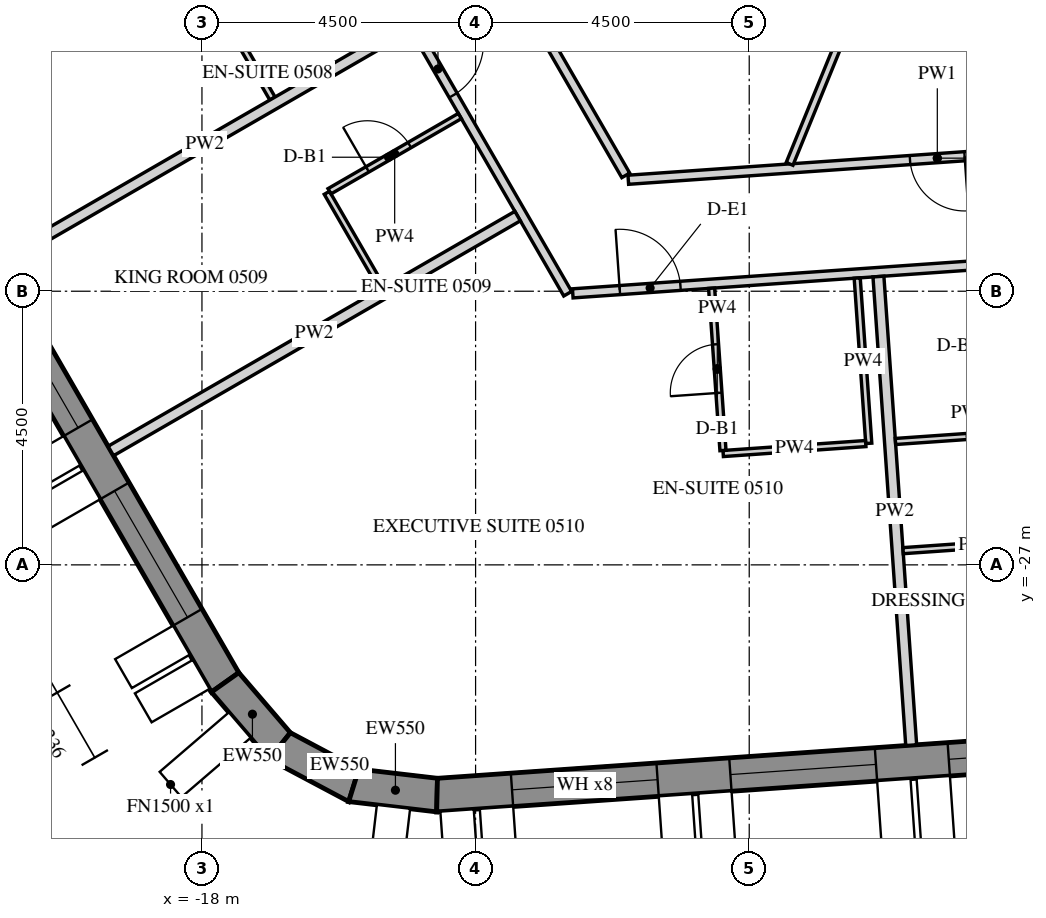
"""IFC4 building model, lengths in metres.
Left out: names, types, materials, properties, quantities, classifications, styles, units other than length and angle.
Written with IfcOpenShell. Run it as: python <this file> out.ifc"""

import sys

from ifc_helpers import new_model, si_unit, direction, frame, frame_2d, origin, place, context, subcontext, project, spatial, polyline, rectangle, outline, extrude, element, fill, save


model = new_model("IFC4")
c1 = context("Model", 3, precision=1e-05, world=origin(), true_north=direction((0.0, 1.0)))
c2 = subcontext(c1, "Body", "Model", "MODEL_VIEW")
j1 = project(units=[si_unit("LENGTHUNIT", "METRE"), si_unit("PLANEANGLEUNIT", "RADIAN")], contexts=[c1])
p1 = place(None, origin())
s1 = spatial("IfcSite", under=j1, at=p1, CompositionType="ELEMENT")
p2 = place(p1, origin())
s2 = spatial("IfcBuilding", under=s1, at=p2, CompositionType="ELEMENT")
p3 = place(p2, frame((0.0, 0.0, 80.4)))
s3 = spatial("IfcBuildingStorey", under=s2, at=p3, CompositionType="ELEMENT", Elevation=80.4)
p4 = place(p3, frame((-32.655, -2.89, -0.15), z_axis=(0.0, 0.0, 1.0), x_axis=(0.499997711317, -0.866026725152, 0.0)))
e1 = element("IfcWall", 1, at=p4, inside=s3, PredefinedType="SOLIDWALL", context=c2, shape_type="SweptSolid", body=[
    extrude(outline(polyline([(-0.022, -0.275), (30.097, -0.275), (30.045, 0.275), (0.022, 0.275), (-0.022, -0.275)])), origin(), (0.0, 0.0, 1.0), 3.9),
])
p5 = place(p4, frame((1.236, 0.0, 1.05)))
e2 = element("IfcOpeningElement", 2, at=p5, cuts=e1, PredefinedType="OPENING", context=c2, shape_type="SweptSolid", body=[
    extrude(rectangle(XDim=2.4, YDim=2.4, at=frame_2d((1.2, 1.2))), frame((0.0, 0.285, 0.0), z_axis=(0.0, -1.0, 0.0), x_axis=(1.0, 0.0, 0.0)), (0.0, 0.0, 1.0), 0.57),
])
p6 = place(p4, frame((4.835, 0.0, 1.05)))
e3 = element("IfcOpeningElement", 3, at=p6, cuts=e1, PredefinedType="OPENING", context=c2, shape_type="SweptSolid", body=[
    extrude(rectangle(XDim=2.4, YDim=2.4, at=frame_2d((1.2, 1.2))), frame((0.0, 0.285, 0.0), z_axis=(0.0, -1.0, 0.0), x_axis=(1.0, 0.0, 0.0)), (0.0, 0.0, 1.0), 0.57),
])
p7 = place(p4, frame((8.436, 0.0, 1.05)))
e4 = element("IfcOpeningElement", 4, at=p7, cuts=e1, PredefinedType="OPENING", context=c2, shape_type="SweptSolid", body=[
    extrude(rectangle(XDim=2.4, YDim=2.4, at=frame_2d((1.2, 1.2))), frame((0.0, 0.285, 0.0), z_axis=(0.0, -1.0, 0.0), x_axis=(1.0, 0.0, 0.0)), (0.0, 0.0, 1.0), 0.57),
])
p8 = place(p4, frame((12.035, 0.0, 1.05)))
e5 = element("IfcOpeningElement", 5, at=p8, cuts=e1, PredefinedType="OPENING", context=c2, shape_type="SweptSolid", body=[
    extrude(rectangle(XDim=2.4, YDim=2.4, at=frame_2d((1.2, 1.2))), frame((0.0, 0.285, 0.0), z_axis=(0.0, -1.0, 0.0), x_axis=(1.0, 0.0, 0.0)), (0.0, 0.0, 1.0), 0.57),
])
p9 = place(p4, frame((15.635, 0.0, 1.05)))
e6 = element("IfcOpeningElement", 6, at=p9, cuts=e1, PredefinedType="OPENING", context=c2, shape_type="SweptSolid", body=[
    extrude(rectangle(XDim=2.4, YDim=2.4, at=frame_2d((1.2, 1.2))), frame((0.0, 0.285, 0.0), z_axis=(0.0, -1.0, 0.0), x_axis=(1.0, 0.0, 0.0)), (0.0, 0.0, 1.0), 0.57),
])
p10 = place(p4, frame((19.236, 0.0, 1.05)))
e7 = element("IfcOpeningElement", 7, at=p10, cuts=e1, PredefinedType="OPENING", context=c2, shape_type="SweptSolid", body=[
    extrude(rectangle(XDim=2.4, YDim=2.4, at=frame_2d((1.2, 1.2))), frame((0.0, 0.285, 0.0), z_axis=(0.0, -1.0, 0.0), x_axis=(1.0, 0.0, 0.0)), (0.0, 0.0, 1.0), 0.57),
])
p11 = place(p4, frame((22.835, 0.0, 1.05)))
e8 = element("IfcOpeningElement", 8, at=p11, cuts=e1, PredefinedType="OPENING", context=c2, shape_type="SweptSolid", body=[
    extrude(rectangle(XDim=2.4, YDim=2.4, at=frame_2d((1.2, 1.2))), frame((0.0, 0.285, 0.0), z_axis=(0.0, -1.0, 0.0), x_axis=(1.0, 0.0, 0.0)), (0.0, 0.0, 1.0), 0.57),
])
p12 = place(p4, frame((26.436, 0.0, 1.05)))
e9 = element("IfcOpeningElement", 9, at=p12, cuts=e1, PredefinedType="OPENING", context=c2, shape_type="SweptSolid", body=[
    extrude(rectangle(XDim=2.4, YDim=2.4, at=frame_2d((1.2, 1.2))), frame((0.0, 0.285, 0.0), z_axis=(0.0, -1.0, 0.0), x_axis=(1.0, 0.0, 0.0)), (0.0, 0.0, 1.0), 0.57),
])
p13 = place(p3, frame((-17.619, -28.932, -0.15), z_axis=(0.0, 0.0, 1.0), x_axis=(0.651621950847, -0.758543890078, 0.0)))
e10 = element("IfcWall", 10, at=p13, inside=s3, PredefinedType="SOLIDWALL", context=c2, shape_type="SweptSolid", body=[
    extrude(outline(polyline([(-0.026, -0.275), (1.431, -0.275), (1.327, 0.275), (0.026, 0.275), (-0.026, -0.275)])), origin(), (0.0, 0.0, 1.0), 3.9),
])
p14 = place(p3, frame((-16.721, -29.979, -0.15), z_axis=(0.0, 0.0, 1.0), x_axis=(0.882994189209, -0.469383917304, 0.0)))
e11 = element("IfcWall", 11, at=p14, inside=s3, PredefinedType="SOLIDWALL", context=c2, shape_type="SweptSolid", body=[
    extrude(outline(polyline([(-0.052, -0.275), (1.431, -0.275), (1.327, 0.275), (0.052, 0.275), (-0.052, -0.275)])), origin(), (0.0, 0.0, 1.0), 3.9),
])
p15 = place(p3, frame((-15.503, -30.626, -0.15), z_axis=(0.0, 0.0, 1.0), x_axis=(0.993232537394, -0.11614269956, 0.0)))
e12 = element("IfcWall", 12, at=p15, inside=s3, PredefinedType="SOLIDWALL", context=c2, shape_type="SweptSolid", body=[
    extrude(outline(polyline([(-0.052, -0.275), (1.405, -0.275), (1.353, 0.275), (0.052, 0.275), (-0.052, -0.275)])), origin(), (0.0, 0.0, 1.0), 3.9),
])
p16 = place(p3, frame((-14.134, -30.786, -0.15), z_axis=(0.0, 0.0, 1.0), x_axis=(0.997564037441, 0.069756657061, 0.0)))
e13 = element("IfcWall", 13, at=p16, inside=s3, PredefinedType="SOLIDWALL", context=c2, shape_type="SweptSolid", body=[
    extrude(outline(polyline([(-0.026, -0.275), (30.094, -0.275), (30.049, 0.275), (0.026, 0.275), (-0.026, -0.275)])), origin(), (0.0, 0.0, 1.0), 3.9),
])
p17 = place(p16, frame((1.236, 0.0, 1.05)))
e14 = element("IfcOpeningElement", 14, at=p17, cuts=e13, PredefinedType="OPENING", context=c2, shape_type="SweptSolid", body=[
    extrude(rectangle(XDim=2.4, YDim=2.4, at=frame_2d((1.2, 1.2))), frame((0.0, 0.285, 0.0), z_axis=(0.0, -1.0, 0.0), x_axis=(1.0, 0.0, 0.0)), (0.0, 0.0, 1.0), 0.57),
])
p18 = place(p16, frame((4.835, 0.0, 1.05)))
e15 = element("IfcOpeningElement", 15, at=p18, cuts=e13, PredefinedType="OPENING", context=c2, shape_type="SweptSolid", body=[
    extrude(rectangle(XDim=2.4, YDim=2.4, at=frame_2d((1.2, 1.2))), frame((0.0, 0.285, 0.0), z_axis=(0.0, -1.0, 0.0), x_axis=(1.0, 0.0, 0.0)), (0.0, 0.0, 1.0), 0.57),
])
p19 = place(p16, frame((8.436, 0.0, 1.05)))
e16 = element("IfcOpeningElement", 16, at=p19, cuts=e13, PredefinedType="OPENING", context=c2, shape_type="SweptSolid", body=[
    extrude(rectangle(XDim=2.4, YDim=2.4, at=frame_2d((1.2, 1.2))), frame((0.0, 0.285, 0.0), z_axis=(0.0, -1.0, 0.0), x_axis=(1.0, 0.0, 0.0)), (0.0, 0.0, 1.0), 0.57),
])
p20 = place(p16, frame((12.035, 0.0, 1.05)))
e17 = element("IfcOpeningElement", 17, at=p20, cuts=e13, PredefinedType="OPENING", context=c2, shape_type="SweptSolid", body=[
    extrude(rectangle(XDim=2.4, YDim=2.4, at=frame_2d((1.2, 1.2))), frame((0.0, 0.285, 0.0), z_axis=(0.0, -1.0, 0.0), x_axis=(1.0, 0.0, 0.0)), (0.0, 0.0, 1.0), 0.57),
])
p21 = place(p16, frame((15.635, 0.0, 1.05)))
e18 = element("IfcOpeningElement", 18, at=p21, cuts=e13, PredefinedType="OPENING", context=c2, shape_type="SweptSolid", body=[
    extrude(rectangle(XDim=2.4, YDim=2.4, at=frame_2d((1.2, 1.2))), frame((0.0, 0.285, 0.0), z_axis=(0.0, -1.0, 0.0), x_axis=(1.0, 0.0, 0.0)), (0.0, 0.0, 1.0), 0.57),
])
p22 = place(p16, frame((19.236, 0.0, 1.05)))
e19 = element("IfcOpeningElement", 19, at=p22, cuts=e13, PredefinedType="OPENING", context=c2, shape_type="SweptSolid", body=[
    extrude(rectangle(XDim=2.4, YDim=2.4, at=frame_2d((1.2, 1.2))), frame((0.0, 0.285, 0.0), z_axis=(0.0, -1.0, 0.0), x_axis=(1.0, 0.0, 0.0)), (0.0, 0.0, 1.0), 0.57),
])
p23 = place(p16, frame((22.835, 0.0, 1.05)))
e20 = element("IfcOpeningElement", 20, at=p23, cuts=e13, PredefinedType="OPENING", context=c2, shape_type="SweptSolid", body=[
    extrude(rectangle(XDim=2.4, YDim=2.4, at=frame_2d((1.2, 1.2))), frame((0.0, 0.285, 0.0), z_axis=(0.0, -1.0, 0.0), x_axis=(1.0, 0.0, 0.0)), (0.0, 0.0, 1.0), 0.57),
])
p24 = place(p16, frame((26.436, 0.0, 1.05)))
e21 = element("IfcOpeningElement", 21, at=p24, cuts=e13, PredefinedType="OPENING", context=c2, shape_type="SweptSolid", body=[
    extrude(rectangle(XDim=2.4, YDim=2.4, at=frame_2d((1.2, 1.2))), frame((0.0, 0.285, 0.0), z_axis=(0.0, -1.0, 0.0), x_axis=(1.0, 0.0, 0.0)), (0.0, 0.0, 1.0), 0.57),
])
p25 = place(p3, frame((-23.743, -2.175, 0.0), z_axis=(0.0, 0.0, 1.0), x_axis=(0.499992353047, -0.86602981871, 0.0)))
e22 = element("IfcWall", 22, at=p25, inside=s3, PredefinedType="PARTITIONING", context=c2, shape_type="SweptSolid", body=[
    extrude(rectangle(XDim=23.516, YDim=0.15, at=frame_2d((11.758, 0.0))), origin(), (0.0, 0.0, 1.0), 2.988),
])
p26 = place(p25, frame((6.256, 0.0, 0.0)))
e23 = element("IfcOpeningElement", 23, at=p26, cuts=e22, PredefinedType="OPENING", context=c2, shape_type="SweptSolid", body=[
    extrude(rectangle(XDim=1.0, YDim=2.1, at=frame_2d((0.5, 1.05))), frame((0.0, 0.085, 0.0), z_axis=(0.0, -1.0, 0.0), x_axis=(1.0, 0.0, 0.0)), (0.0, 0.0, 1.0), 0.17),
])
p27 = place(p25, frame((13.099, 0.0, 0.0)))
e24 = element("IfcOpeningElement", 24, at=p27, cuts=e22, PredefinedType="OPENING", context=c2, shape_type="SweptSolid", body=[
    extrude(rectangle(XDim=1.0, YDim=2.1, at=frame_2d((0.5, 1.05))), frame((0.0, 0.085, 0.0), z_axis=(0.0, -1.0, 0.0), x_axis=(1.0, 0.0, 0.0)), (0.0, 0.0, 1.0), 0.17),
])
p28 = place(p25, frame((18.749, 0.0, 0.0)))
e25 = element("IfcOpeningElement", 25, at=p28, cuts=e22, PredefinedType="OPENING", context=c2, shape_type="SweptSolid", body=[
    extrude(rectangle(XDim=1.0, YDim=2.1, at=frame_2d((0.5, 1.05))), frame((0.0, 0.085, 0.0), z_axis=(0.0, -1.0, 0.0), x_axis=(1.0, 0.0, 0.0)), (0.0, 0.0, 1.0), 0.17),
])
p29 = place(p3, frame((-11.902, -22.535, 0.0), z_axis=(0.0, 0.0, 1.0), x_axis=(0.997564081796, 0.069756022752, 0.0)))
e26 = element("IfcWall", 26, at=p29, inside=s3, PredefinedType="PARTITIONING", context=c2, shape_type="SweptSolid", body=[
    extrude(rectangle(XDim=21.668, YDim=0.15, at=frame_2d((10.834, 0.0))), origin(), (0.0, 0.0, 1.0), 2.988),
])
p30 = place(p29, frame((0.775, 0.0, 0.0)))
e27 = element("IfcOpeningElement", 27, at=p30, cuts=e26, PredefinedType="OPENING", context=c2, shape_type="SweptSolid", body=[
    extrude(rectangle(XDim=1.0, YDim=2.1, at=frame_2d((0.5, 1.05))), frame((0.0, 0.085, 0.0), z_axis=(0.0, -1.0, 0.0), x_axis=(1.0, 0.0, 0.0)), (0.0, 0.0, 1.0), 0.17),
])
p31 = place(p29, frame((11.234, 0.0, 0.0)))
e28 = element("IfcOpeningElement", 28, at=p31, cuts=e26, PredefinedType="OPENING", context=c2, shape_type="SweptSolid", body=[
    extrude(rectangle(XDim=1.0, YDim=2.1, at=frame_2d((0.5, 1.05))), frame((0.0, 0.085, 0.0), z_axis=(0.0, -1.0, 0.0), x_axis=(1.0, 0.0, 0.0)), (0.0, 0.0, 1.0), 0.17),
])
p32 = place(p29, frame((19.451, 0.0, 0.0)))
e29 = element("IfcOpeningElement", 29, at=p32, cuts=e26, PredefinedType="OPENING", context=c2, shape_type="SweptSolid", body=[
    extrude(rectangle(XDim=1.0, YDim=2.1, at=frame_2d((0.5, 1.05))), frame((0.0, 0.085, 0.0), z_axis=(0.0, -1.0, 0.0), x_axis=(1.0, 0.0, 0.0)), (0.0, 0.0, 1.0), 0.17),
])
p33 = place(p3, frame((-0.825, -19.956, 0.0), z_axis=(0.0, 0.0, 1.0), x_axis=(-0.997562587881, -0.069777383582, 0.0)))
e30 = element("IfcWall", 30, at=p33, inside=s3, PredefinedType="PARTITIONING", context=c2, shape_type="SweptSolid", body=[
    extrude(rectangle(XDim=10.189, YDim=0.15, at=frame_2d((5.094, 0.0))), origin(), (0.0, 0.0, 1.0), 2.988),
])
p34 = place(p33, frame((4.644, 0.0, 0.0)))
e31 = element("IfcOpeningElement", 31, at=p34, cuts=e30, PredefinedType="OPENING", context=c2, shape_type="SweptSolid", body=[
    extrude(rectangle(XDim=0.9, YDim=2.1, at=frame_2d((0.45, 1.05))), frame((0.0, 0.085, 0.0), z_axis=(0.0, -1.0, 0.0), x_axis=(1.0, 0.0, 0.0)), (0.0, 0.0, 1.0), 0.17),
])
p35 = place(p3, frame((-11.031, -20.595, 0.0), z_axis=(0.0, 0.0, 1.0), x_axis=(-0.499987422378, 0.866032665356, 0.0)))
e32 = element("IfcWall", 32, at=p35, inside=s3, PredefinedType="PARTITIONING", context=c2, shape_type="SweptSolid", body=[
    extrude(rectangle(XDim=11.299, YDim=0.15, at=frame_2d((5.649, 0.0))), origin(), (0.0, 0.0, 1.0), 2.988),
])
p36 = place(p35, frame((5.199, 0.0, 0.0)))
e33 = element("IfcOpeningElement", 33, at=p36, cuts=e32, PredefinedType="OPENING", context=c2, shape_type="SweptSolid", body=[
    extrude(rectangle(XDim=0.9, YDim=2.1, at=frame_2d((0.45, 1.05))), frame((0.0, 0.085, 0.0), z_axis=(0.0, -1.0, 0.0), x_axis=(1.0, 0.0, 0.0)), (0.0, 0.0, 1.0), 0.17),
])
p37 = place(p3, frame((-16.841, -19.331, 0.0), z_axis=(0.0, 0.0, 1.0), x_axis=(-0.500015210774, 0.866016621662, 0.0)))
e34 = element("IfcWall", 34, at=p37, inside=s3, PredefinedType="PARTITIONING", context=c2, shape_type="SweptSolid", body=[
    extrude(rectangle(XDim=2.31, YDim=0.1, at=frame_2d((1.155, 0.0))), origin(), (0.0, 0.0, 1.0), 2.988),
])
p38 = place(p3, frame((-21.299, -22.009, 0.0), z_axis=(0.0, 0.0, 1.0), x_axis=(0.866019273868, 0.500010617176, 0.0)))
e35 = element("IfcWall", 35, at=p38, inside=s3, PredefinedType="PARTITIONING", context=c2, shape_type="SweptSolid", body=[
    extrude(rectangle(XDim=7.725, YDim=0.18, at=frame_2d((3.862, 0.0))), origin(), (0.0, 0.0, 1.0), 2.988),
])
p39 = place(p3, frame((-15.041, -22.449, 0.0), z_axis=(0.0, 0.0, 1.0), x_axis=(-0.499983199978, 0.866035103064, 0.0)))
e36 = element("IfcWall", 36, at=p39, inside=s3, PredefinedType="PARTITIONING", context=c2, shape_type="SweptSolid", body=[
    extrude(rectangle(XDim=1.81, YDim=0.1, at=frame_2d((0.905, 0.0))), origin(), (0.0, 0.0, 1.0), 2.988),
])
p40 = place(p3, frame((-15.902, -20.856, 0.0), z_axis=(0.0, 0.0, 1.0), x_axis=(0.866031185235, 0.4999899861, 0.0)))
e37 = element("IfcWall", 37, at=p40, inside=s3, PredefinedType="PARTITIONING", context=c2, shape_type="SweptSolid", body=[
    extrude(rectangle(XDim=2.475, YDim=0.1, at=frame_2d((1.238, 0.0))), origin(), (0.0, 0.0, 1.0), 2.988),
])
p41 = place(p40, frame((0.72, 0.0, 0.0)))
e38 = element("IfcOpeningElement", 38, at=p41, cuts=e37, PredefinedType="OPENING", context=c2, shape_type="SweptSolid", body=[
    extrude(rectangle(XDim=0.8, YDim=2.1, at=frame_2d((0.4, 1.05))), frame((0.0, 0.06, 0.0), z_axis=(0.0, -1.0, 0.0), x_axis=(1.0, 0.0, 0.0)), (0.0, 0.0, 1.0), 0.12),
])
p42 = place(p3, frame((-19.499, -25.127, 0.0), z_axis=(0.0, 0.0, 1.0), x_axis=(0.866027174938, 0.499996932259, 0.0)))
e39 = element("IfcWall", 39, at=p42, inside=s3, PredefinedType="PARTITIONING", context=c2, shape_type="SweptSolid", body=[
    extrude(rectangle(XDim=7.725, YDim=0.18, at=frame_2d((3.863, 0.0))), origin(), (0.0, 0.0, 1.0), 2.988),
])
p43 = place(p3, frame((-7.224, -22.283, 0.0), z_axis=(0.0, 0.0, 1.0), x_axis=(0.069795247212, -0.997561338198, 0.0)))
e40 = element("IfcWall", 40, at=p43, inside=s3, PredefinedType="PARTITIONING", context=c2, shape_type="SweptSolid", body=[
    extrude(rectangle(XDim=2.725, YDim=0.1, at=frame_2d((1.362, 0.0))), origin(), (0.0, 0.0, 1.0), 2.988),
])
p44 = place(p3, frame((-7.084, -25.005, 0.0), z_axis=(0.0, 0.0, 1.0), x_axis=(-0.997567715103, -0.06970404424, 0.0)))
e41 = element("IfcWall", 41, at=p44, inside=s3, PredefinedType="PARTITIONING", context=c2, shape_type="SweptSolid", body=[
    extrude(rectangle(XDim=2.35, YDim=0.1, at=frame_2d((1.175, 0.0))), origin(), (0.0, 0.0, 1.0), 2.988),
])
p45 = place(p3, frame((-9.432, -25.119, 0.0), z_axis=(0.0, 0.0, 1.0), x_axis=(-0.069729221413, 0.997565955554, 0.0)))
e42 = element("IfcWall", 42, at=p45, inside=s3, PredefinedType="PARTITIONING", context=c2, shape_type="SweptSolid", body=[
    extrude(rectangle(XDim=2.675, YDim=0.1, at=frame_2d((1.337, 0.0))), origin(), (0.0, 0.0, 1.0), 2.988),
])
p46 = place(p45, frame((0.95, 0.0, 0.0)))
e43 = element("IfcOpeningElement", 43, at=p46, cuts=e42, PredefinedType="OPENING", context=c2, shape_type="SweptSolid", body=[
    extrude(rectangle(XDim=0.8, YDim=2.1, at=frame_2d((0.4, 1.05))), frame((0.0, 0.06, 0.0), z_axis=(0.0, -1.0, 0.0), x_axis=(1.0, 0.0, 0.0)), (0.0, 0.0, 1.0), 0.12),
])
p47 = place(p3, frame((-6.336, -29.965, 0.0), z_axis=(0.0, 0.0, 1.0), x_axis=(-0.069780381152, 0.997562378203, 0.0)))
e44 = element("IfcWall", 44, at=p47, inside=s3, PredefinedType="PARTITIONING", context=c2, shape_type="SweptSolid", body=[
    extrude(rectangle(XDim=7.725, YDim=0.18, at=frame_2d((3.863, 0.0))), origin(), (0.0, 0.0, 1.0), 2.988),
])
p48 = place(p3, frame((-4.016, -26.595, 0.0), z_axis=(0.0, 0.0, 1.0), x_axis=(-0.997563389425, -0.069765923475, 0.0)))
e45 = element("IfcWall", 45, at=p48, inside=s3, PredefinedType="PARTITIONING", context=c2, shape_type="SweptSolid", body=[
    extrude(rectangle(XDim=2.46, YDim=0.1, at=frame_2d((1.23, 0.0))), origin(), (0.0, 0.0, 1.0), 2.988),
])
p49 = place(p3, frame((-6.595, -24.971, 0.0), z_axis=(0.0, 0.0, 1.0), x_axis=(0.997562906323, 0.069772830877, 0.0)))
e46 = element("IfcWall", 46, at=p49, inside=s3, PredefinedType="PARTITIONING", context=c2, shape_type="SweptSolid", body=[
    extrude(rectangle(XDim=2.46, YDim=0.1, at=frame_2d((1.23, 0.0))), origin(), (0.0, 0.0, 1.0), 2.988),
])
p50 = place(p3, frame((-5.719, -14.0, 0.0), z_axis=(0.0, 0.0, 1.0), x_axis=(-0.378193217714, -0.925726682166, 0.0)))
e47 = element("IfcWall", 47, at=p50, inside=s3, PredefinedType="PARTITIONING", context=c2, shape_type="SweptSolid", body=[
    extrude(rectangle(XDim=6.92, YDim=0.12, at=frame_2d((3.46, 0.0))), origin(), (0.0, 0.0, 1.0), 2.988),
])
p51 = place(p11, frame((0.0, 0.205, 0.0)))
e48 = element("IfcWindow", 48, at=p51, inside=s3, PartitioningType="DOUBLE_PANEL_VERTICAL", PredefinedType="WINDOW", context=c2, shape_type="SweptSolid", body=[
    extrude(rectangle(XDim=2.4, YDim=2.4, at=frame_2d((1.2, 1.2))), frame((0.0, 0.03, 0.0), z_axis=(0.0, -1.0, 0.0), x_axis=(1.0, 0.0, 0.0)), (0.0, 0.0, 1.0), 0.06),
])
fill(e8, e48)
p52 = place(p12, frame((0.0, 0.205, 0.0)))
e49 = element("IfcWindow", 49, at=p52, inside=s3, PartitioningType="DOUBLE_PANEL_VERTICAL", PredefinedType="WINDOW", context=c2, shape_type="SweptSolid", body=[
    extrude(rectangle(XDim=2.4, YDim=2.4, at=frame_2d((1.2, 1.2))), frame((0.0, 0.03, 0.0), z_axis=(0.0, -1.0, 0.0), x_axis=(1.0, 0.0, 0.0)), (0.0, 0.0, 1.0), 0.06),
])
fill(e9, e49)
p53 = place(p17, frame((0.0, 0.205, 0.0)))
e50 = element("IfcWindow", 50, at=p53, inside=s3, PartitioningType="DOUBLE_PANEL_VERTICAL", PredefinedType="WINDOW", context=c2, shape_type="SweptSolid", body=[
    extrude(rectangle(XDim=2.4, YDim=2.4, at=frame_2d((1.2, 1.2))), frame((0.0, 0.03, 0.0), z_axis=(0.0, -1.0, 0.0), x_axis=(1.0, 0.0, 0.0)), (0.0, 0.0, 1.0), 0.06),
])
fill(e14, e50)
p54 = place(p18, frame((0.0, 0.205, 0.0)))
e51 = element("IfcWindow", 51, at=p54, inside=s3, PartitioningType="DOUBLE_PANEL_VERTICAL", PredefinedType="WINDOW", context=c2, shape_type="SweptSolid", body=[
    extrude(rectangle(XDim=2.4, YDim=2.4, at=frame_2d((1.2, 1.2))), frame((0.0, 0.03, 0.0), z_axis=(0.0, -1.0, 0.0), x_axis=(1.0, 0.0, 0.0)), (0.0, 0.0, 1.0), 0.06),
])
fill(e15, e51)
p55 = place(p19, frame((0.0, 0.205, 0.0)))
e52 = element("IfcWindow", 52, at=p55, inside=s3, PartitioningType="DOUBLE_PANEL_VERTICAL", PredefinedType="WINDOW", context=c2, shape_type="SweptSolid", body=[
    extrude(rectangle(XDim=2.4, YDim=2.4, at=frame_2d((1.2, 1.2))), frame((0.0, 0.03, 0.0), z_axis=(0.0, -1.0, 0.0), x_axis=(1.0, 0.0, 0.0)), (0.0, 0.0, 1.0), 0.06),
])
fill(e16, e52)
p56 = place(p28, origin())
e53 = element("IfcDoor", 53, at=p56, inside=s3, OperationType="SINGLE_SWING_RIGHT", PredefinedType="DOOR", context=c2, shape_type="SweptSolid", body=[
    extrude(rectangle(XDim=1.0, YDim=2.1, at=frame_2d((0.5, 1.05))), frame((0.0, 0.025, 0.0), z_axis=(0.0, -1.0, 0.0), x_axis=(1.0, 0.0, 0.0)), (0.0, 0.0, 1.0), 0.05),
])
fill(e25, e53)
p57 = place(p41, origin())
e54 = element("IfcDoor", 54, at=p57, inside=s3, OperationType="SINGLE_SWING_RIGHT", PredefinedType="DOOR", context=c2, shape_type="SweptSolid", body=[
    extrude(rectangle(XDim=0.8, YDim=2.1, at=frame_2d((0.4, 1.05))), frame((0.0, 0.025, 0.0), z_axis=(0.0, -1.0, 0.0), x_axis=(1.0, 0.0, 0.0)), (0.0, 0.0, 1.0), 0.05),
])
fill(e38, e54)
p58 = place(p30, origin())
e55 = element("IfcDoor", 55, at=p58, inside=s3, OperationType="SINGLE_SWING_RIGHT", PredefinedType="DOOR", context=c2, shape_type="SweptSolid", body=[
    extrude(rectangle(XDim=1.0, YDim=2.1, at=frame_2d((0.5, 1.05))), frame((0.0, 0.025, 0.0), z_axis=(0.0, -1.0, 0.0), x_axis=(1.0, 0.0, 0.0)), (0.0, 0.0, 1.0), 0.05),
])
fill(e27, e55)
p59 = place(p46, origin())
e56 = element("IfcDoor", 56, at=p59, inside=s3, OperationType="SINGLE_SWING_LEFT", PredefinedType="DOOR", context=c2, shape_type="SweptSolid", body=[
    extrude(rectangle(XDim=0.8, YDim=2.1, at=frame_2d((0.4, 1.05))), frame((0.0, 0.025, 0.0), z_axis=(0.0, -1.0, 0.0), x_axis=(1.0, 0.0, 0.0)), (0.0, 0.0, 1.0), 0.05),
])
fill(e43, e56)
p60 = place(p34, origin())
e57 = element("IfcDoor", 57, at=p60, inside=s3, OperationType="SINGLE_SWING_LEFT", PredefinedType="DOOR", context=c2, shape_type="SweptSolid", body=[
    extrude(rectangle(XDim=0.9, YDim=2.1, at=frame_2d((0.45, 1.05))), frame((0.0, 0.025, 0.0), z_axis=(0.0, -1.0, 0.0), x_axis=(1.0, 0.0, 0.0)), (0.0, 0.0, 1.0), 0.05),
])
fill(e31, e57)
save(model, sys.argv[1])
